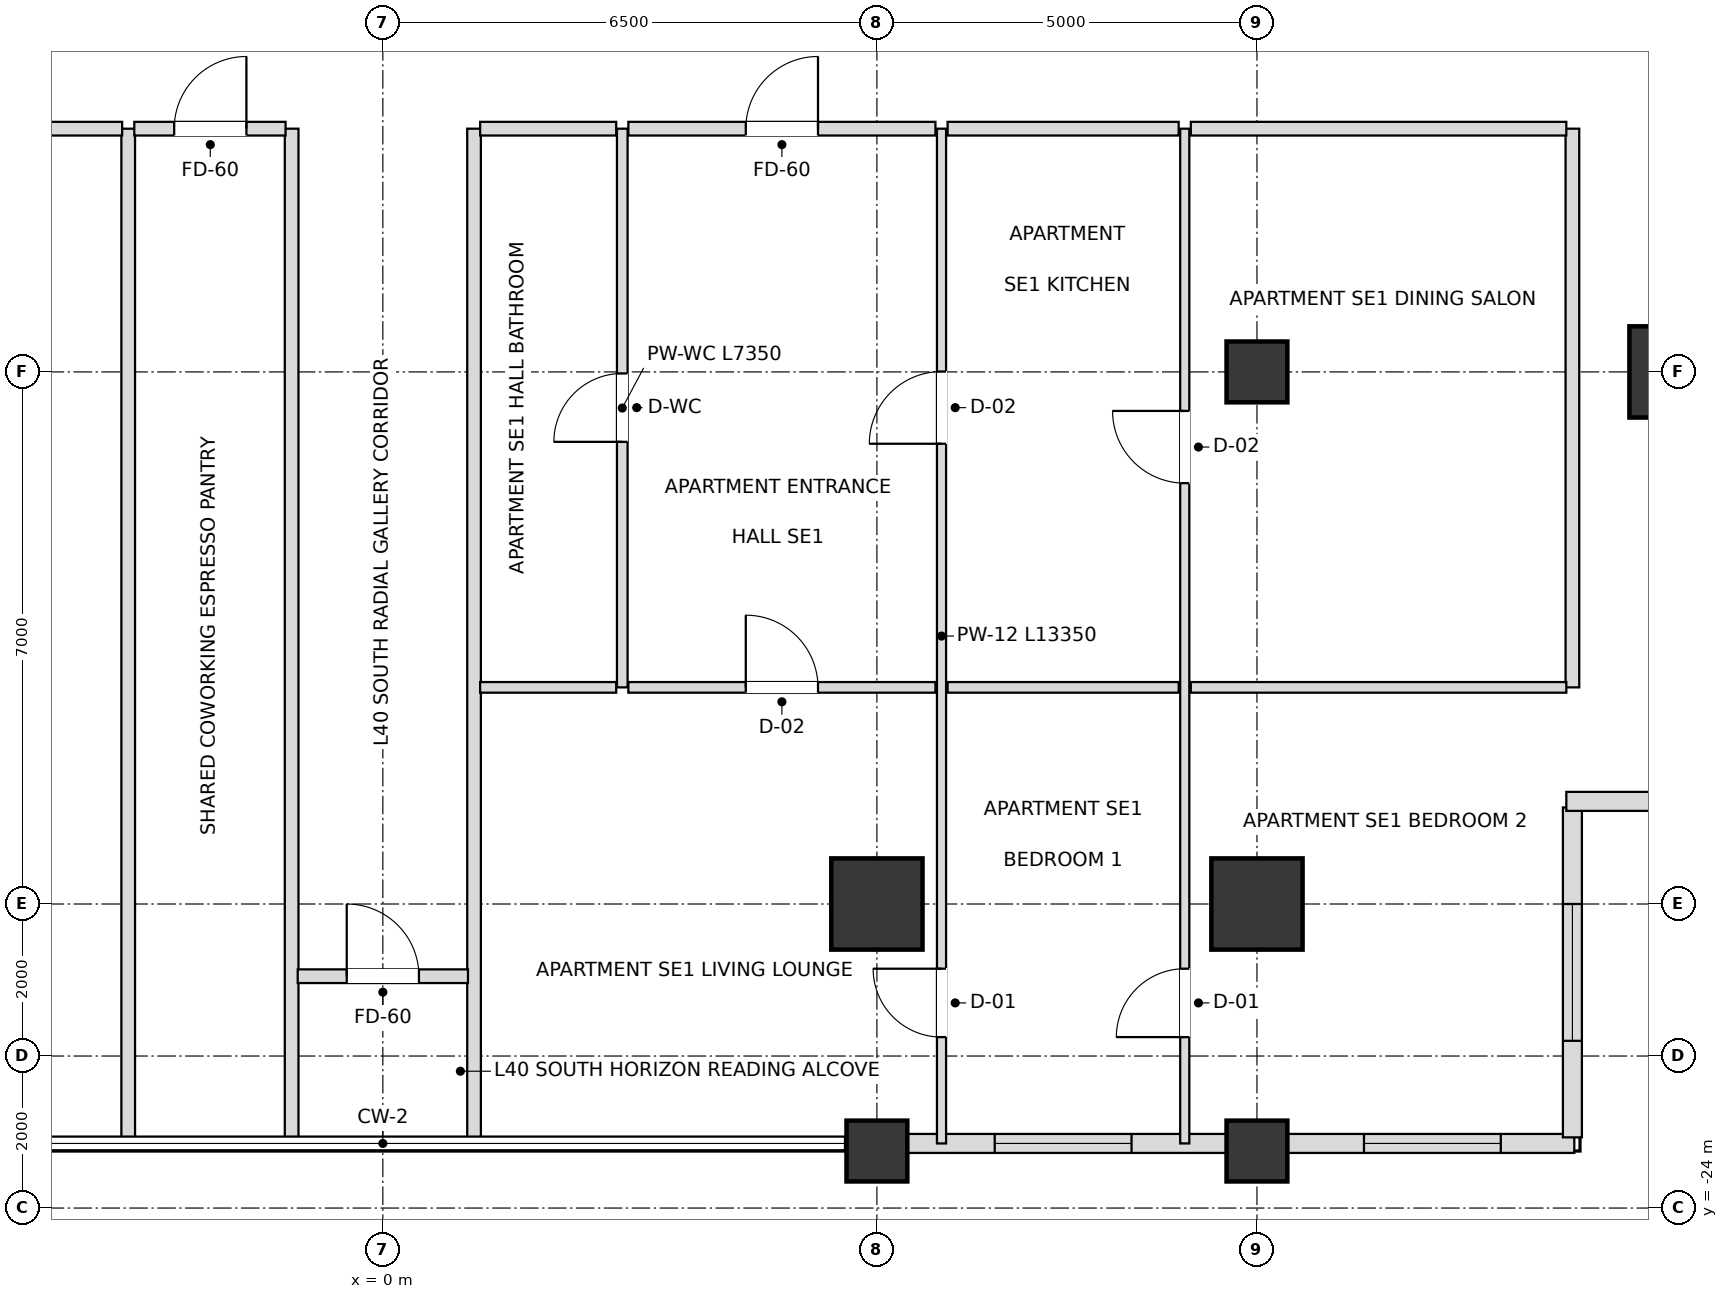
"""IFC4 building model, lengths in metres.
Left out: names, types, materials, properties, quantities, classifications, styles, units other than length and angle.
Written with IfcOpenShell. Run it as: python <this file> out.ifc"""

import sys

from ifc_helpers import new_model, si_unit, direction, frame, frame_2d, origin, origin_2d, place, context, subcontext, project, spatial, rectangle, extrude, element, fill, save


model = new_model("IFC4")
c1 = context("Model", 3, precision=1e-05, world=origin(), true_north=direction((0.0, 1.0)))
c2 = subcontext(c1, "Body", "Model", "MODEL_VIEW")
j1 = project(units=[si_unit("LENGTHUNIT", "METRE"), si_unit("PLANEANGLEUNIT", "RADIAN")], contexts=[c1])
p1 = place(None, origin())
s1 = spatial("IfcSite", under=j1, at=p1, CompositionType="ELEMENT")
p2 = place(p1, origin())
s2 = spatial("IfcBuilding", under=s1, at=p2, CompositionType="ELEMENT")
p3 = place(p2, frame((0.0, 0.0, 158.4)))
s3 = spatial("IfcBuildingStorey", under=s2, at=p3, CompositionType="ELEMENT", Elevation=158.4)
for number, where, z_axis, x_axis in (
    (1, (6.5, -20.0, 0.0), (0.0, 0.0, 1.0), (1.0, 0.0, 0.0)),
    (2, (11.5, -20.0, 0.0), (0.0, 0.0, 1.0), (1.0, 0.0, 0.0)),
    (3, (17.0, -13.0, 0.0), (0.0, 0.0, 1.0), (1.0, 0.0, 0.0)),
):
    element("IfcColumn", number, at=place(p3, frame(where, z_axis=z_axis, x_axis=x_axis)), inside=s3, PredefinedType="USERDEFINED", context=c2, shape_type="SweptSolid", body=[
        extrude(rectangle(XDim=1.2, YDim=1.2, at=origin_2d()), origin(), (0.0, 0.0, 1.0), 3.6),
    ])
for number, where, z_axis, x_axis in (
    (4, (11.5, -13.0, 0.0), (0.0, 0.0, 1.0), (1.0, 0.0, 0.0)),
    (5, (6.5, -23.25, 0.0), (0.0, 0.0, 1.0), (1.0, 0.0, 0.0)),
    (6, (11.5, -23.25, 0.0), (0.0, 0.0, 1.0), (1.0, 0.0, 0.0)),
):
    element("IfcColumn", number, at=place(p3, frame(where, z_axis=z_axis, x_axis=x_axis)), inside=s3, PredefinedType="COLUMN", context=c2, shape_type="SweptSolid", body=[
        extrude(rectangle(XDim=0.8, YDim=0.8, at=origin_2d()), origin(), (0.0, 0.0, 1.0), 3.6),
    ])
p4 = place(p3, frame((6.895, -23.15, 0.0), z_axis=(0.0, 0.0, 1.0), x_axis=(1.0, 0.0, 0.0)))
e7 = element("IfcWall", 7, at=p4, inside=s3, PredefinedType="SOLIDWALL", context=c2, shape_type="SweptSolid", body=[
    extrude(rectangle(XDim=4.21, YDim=0.25, at=frame_2d((2.105, 0.0))), origin(), (0.0, 0.0, 1.0), 2.736),
])
p5 = place(p4, frame((1.155, 0.0, 0.72)))
e8 = element("IfcOpeningElement", 8, at=p5, cuts=e7, PredefinedType="OPENING", context=c2, shape_type="SweptSolid", body=[
    extrude(rectangle(XDim=1.8, YDim=1.68, at=frame_2d((0.9, 0.84))), frame((0.0, 0.135, 0.0), z_axis=(0.0, -1.0, 0.0), x_axis=(1.0, 0.0, 0.0)), (0.0, 0.0, 1.0), 0.27),
])
p6 = place(p3, frame((11.895, -23.15, 0.0), z_axis=(0.0, 0.0, 1.0), x_axis=(1.0, 0.0, 0.0)))
e9 = element("IfcWall", 9, at=p6, inside=s3, PredefinedType="SOLIDWALL", context=c2, shape_type="SweptSolid", body=[
    extrude(rectangle(XDim=3.78, YDim=0.25, at=frame_2d((1.89, 0.0))), origin(), (0.0, 0.0, 1.0), 2.736),
])
p7 = place(p6, frame((1.013, 0.0, 0.72)))
e10 = element("IfcOpeningElement", 10, at=p7, cuts=e9, PredefinedType="OPENING", context=c2, shape_type="SweptSolid", body=[
    extrude(rectangle(XDim=1.8, YDim=1.68, at=frame_2d((0.9, 0.84))), frame((0.0, 0.135, 0.0), z_axis=(0.0, -1.0, 0.0), x_axis=(1.0, 0.0, 0.0)), (0.0, 0.0, 1.0), 0.27),
])
p8 = place(p3, frame((15.65, -23.07, 0.0), z_axis=(0.0, 0.0, 1.0), x_axis=(0.0, 1.0, 0.0)))
e11 = element("IfcWall", 11, at=p8, inside=s3, PredefinedType="SOLIDWALL", context=c2, shape_type="SweptSolid", body=[
    extrude(rectangle(XDim=4.34, YDim=0.25, at=frame_2d((2.17, 0.0))), origin(), (0.0, 0.0, 1.0), 2.736),
])
p9 = place(p8, frame((1.27, 0.0, 0.72)))
e12 = element("IfcOpeningElement", 12, at=p9, cuts=e11, PredefinedType="OPENING", context=c2, shape_type="SweptSolid", body=[
    extrude(rectangle(XDim=1.8, YDim=1.68, at=frame_2d((0.9, 0.84))), frame((0.0, 0.135, 0.0), z_axis=(0.0, -1.0, 0.0), x_axis=(1.0, 0.0, 0.0)), (0.0, 0.0, 1.0), 0.27),
])
p10 = place(p3, frame((15.57, -18.65, 0.0), z_axis=(0.0, 0.0, 1.0), x_axis=(1.0, 0.0, 0.0)))
e13 = element("IfcWall", 13, at=p10, inside=s3, PredefinedType="SOLIDWALL", context=c2, shape_type="SweptSolid", body=[
    extrude(rectangle(XDim=4.66, YDim=0.25, at=frame_2d((2.33, 0.0))), origin(), (0.0, 0.0, 1.0), 2.736),
])
p11 = place(p10, frame((1.43, 0.0, 0.72)))
e14 = element("IfcOpeningElement", 14, at=p11, cuts=e13, PredefinedType="OPENING", context=c2, shape_type="SweptSolid", body=[
    extrude(rectangle(XDim=1.8, YDim=1.68, at=frame_2d((0.9, 0.84))), frame((0.0, 0.135, 0.0), z_axis=(0.0, -1.0, 0.0), x_axis=(1.0, 0.0, 0.0)), (0.0, 0.0, 1.0), 0.27),
])
for number, where, z_axis, x_axis in (
    (15, (-3.35, -23.15, 0.0), (0.0, 0.0, 1.0), (0.0, 1.0, 0.0)),
    (16, (-1.2, -23.15, 0.0), (0.0, 0.0, 1.0), (0.0, 1.0, 0.0)),
    (17, (1.2, -23.15, 0.0), (0.0, 0.0, 1.0), (0.0, 1.0, 0.0)),
):
    element("IfcWall", number, at=place(p3, frame(where, z_axis=z_axis, x_axis=x_axis)), inside=s3, PredefinedType="PARTITIONING", context=c2, shape_type="SweptSolid", body=[
        extrude(rectangle(XDim=13.35, YDim=0.18, at=frame_2d((6.675, 0.0))), origin(), (0.0, 0.0, 1.0), 2.816),
    ])
p12 = place(p3, frame((3.15, -17.15, 0.0), z_axis=(0.0, 0.0, 1.0), x_axis=(0.0, 1.0, 0.0)))
e18 = element("IfcWall", 18, at=p12, inside=s3, PredefinedType="PARTITIONING", context=c2, shape_type="SweptSolid", body=[
    extrude(rectangle(XDim=7.35, YDim=0.14, at=frame_2d((3.675, 0.0))), origin(), (0.0, 0.0, 1.0), 3.38),
])
p13 = place(p12, frame((3.23, 0.0, 0.0)))
e19 = element("IfcOpeningElement", 19, at=p13, cuts=e18, PredefinedType="OPENING", context=c2, shape_type="SweptSolid", body=[
    extrude(rectangle(XDim=0.9, YDim=2.1, at=frame_2d((0.45, 1.05))), frame((0.0, 0.08, 0.0), z_axis=(0.0, -1.0, 0.0), x_axis=(1.0, 0.0, 0.0)), (0.0, 0.0, 1.0), 0.16),
])
p14 = place(p3, frame((7.35, -23.15, 0.0), z_axis=(0.0, 0.0, 1.0), x_axis=(0.0, 1.0, 0.0)))
e20 = element("IfcWall", 20, at=p14, inside=s3, PredefinedType="PARTITIONING", context=c2, shape_type="SweptSolid", body=[
    extrude(rectangle(XDim=13.35, YDim=0.12, at=frame_2d((6.675, 0.0))), origin(), (0.0, 0.0, 1.0), 2.816),
])
p15 = place(p14, frame((9.205, 0.0, 0.0)))
e21 = element("IfcOpeningElement", 21, at=p15, cuts=e20, PredefinedType="OPENING", context=c2, shape_type="SweptSolid", body=[
    extrude(rectangle(XDim=0.95, YDim=2.1, at=frame_2d((0.475, 1.05))), frame((0.0, 0.07, 0.0), z_axis=(0.0, -1.0, 0.0), x_axis=(1.0, 0.0, 0.0)), (0.0, 0.0, 1.0), 0.14),
])
p16 = place(p14, frame((1.399, 0.0, 0.0)))
e22 = element("IfcOpeningElement", 22, at=p16, cuts=e20, PredefinedType="OPENING", context=c2, shape_type="SweptSolid", body=[
    extrude(rectangle(XDim=0.9, YDim=2.1, at=frame_2d((0.45, 1.05))), frame((0.0, 0.07, 0.0), z_axis=(0.0, -1.0, 0.0), x_axis=(1.0, 0.0, 0.0)), (0.0, 0.0, 1.0), 0.14),
])
p17 = place(p3, frame((10.55, -23.15, 0.0), z_axis=(0.0, 0.0, 1.0), x_axis=(0.0, 1.0, 0.0)))
e23 = element("IfcWall", 23, at=p17, inside=s3, PredefinedType="PARTITIONING", context=c2, shape_type="SweptSolid", body=[
    extrude(rectangle(XDim=13.35, YDim=0.12, at=frame_2d((6.675, 0.0))), origin(), (0.0, 0.0, 1.0), 2.816),
])
p18 = place(p17, frame((8.687, 0.0, 0.0)))
e24 = element("IfcOpeningElement", 24, at=p18, cuts=e23, PredefinedType="OPENING", context=c2, shape_type="SweptSolid", body=[
    extrude(rectangle(XDim=0.95, YDim=2.1, at=frame_2d((0.475, 1.05))), frame((0.0, 0.07, 0.0), z_axis=(0.0, -1.0, 0.0), x_axis=(1.0, 0.0, 0.0)), (0.0, 0.0, 1.0), 0.14),
])
p19 = place(p17, frame((1.399, 0.0, 0.0)))
e25 = element("IfcOpeningElement", 25, at=p19, cuts=e23, PredefinedType="OPENING", context=c2, shape_type="SweptSolid", body=[
    extrude(rectangle(XDim=0.9, YDim=2.1, at=frame_2d((0.45, 1.05))), frame((0.0, 0.07, 0.0), z_axis=(0.0, -1.0, 0.0), x_axis=(1.0, 0.0, 0.0)), (0.0, 0.0, 1.0), 0.14),
])
p20 = place(p3, frame((15.65, -17.15, 0.0), z_axis=(0.0, 0.0, 1.0), x_axis=(0.0, 1.0, 0.0)))
e26 = element("IfcWall", 26, at=p20, inside=s3, PredefinedType="PARTITIONING", context=c2, shape_type="SweptSolid", body=[
    extrude(rectangle(XDim=7.35, YDim=0.18, at=frame_2d((3.675, 0.0))), origin(), (0.0, 0.0, 1.0), 2.736),
])
p21 = place(p3, frame((-1.12, -20.95, 0.0), z_axis=(0.0, 0.0, 1.0), x_axis=(1.0, 0.0, 0.0)))
e27 = element("IfcWall", 27, at=p21, inside=s3, PredefinedType="PARTITIONING", context=c2, shape_type="SweptSolid", body=[
    extrude(rectangle(XDim=2.24, YDim=0.18, at=frame_2d((1.12, 0.0))), origin(), (0.0, 0.0, 1.0), 3.38),
])
p22 = place(p21, frame((0.645, 0.0, 0.0)))
e28 = element("IfcOpeningElement", 28, at=p22, cuts=e27, PredefinedType="OPENING", context=c2, shape_type="SweptSolid", body=[
    extrude(rectangle(XDim=0.95, YDim=2.15, at=frame_2d((0.475, 1.075))), frame((0.0, 0.1, 0.0), z_axis=(0.0, -1.0, 0.0), x_axis=(1.0, 0.0, 0.0)), (0.0, 0.0, 1.0), 0.2),
])
p23 = place(p3, frame((1.28, -17.15, 0.0), z_axis=(0.0, 0.0, 1.0), x_axis=(1.0, 0.0, 0.0)))
e29 = element("IfcWall", 29, at=p23, inside=s3, PredefinedType="PARTITIONING", context=c2, shape_type="SweptSolid", body=[
    extrude(rectangle(XDim=1.79, YDim=0.14, at=frame_2d((0.895, 0.0))), origin(), (0.0, 0.0, 1.0), 3.38),
])
p24 = place(p3, frame((3.23, -17.15, 0.0), z_axis=(0.0, 0.0, 1.0), x_axis=(1.0, 0.0, 0.0)))
e30 = element("IfcWall", 30, at=p24, inside=s3, PredefinedType="PARTITIONING", context=c2, shape_type="SweptSolid", body=[
    extrude(rectangle(XDim=4.04, YDim=0.14, at=frame_2d((2.02, 0.0))), origin(), (0.0, 0.0, 1.0), 2.816),
])
p25 = place(p24, frame((1.545, 0.0, 0.0)))
e31 = element("IfcOpeningElement", 31, at=p25, cuts=e30, PredefinedType="OPENING", context=c2, shape_type="SweptSolid", body=[
    extrude(rectangle(XDim=0.95, YDim=2.1, at=frame_2d((0.475, 1.05))), frame((0.0, 0.08, 0.0), z_axis=(0.0, -1.0, 0.0), x_axis=(1.0, 0.0, 0.0)), (0.0, 0.0, 1.0), 0.16),
])
p26 = place(p3, frame((7.43, -17.15, 0.0), z_axis=(0.0, 0.0, 1.0), x_axis=(1.0, 0.0, 0.0)))
e32 = element("IfcWall", 32, at=p26, inside=s3, PredefinedType="PARTITIONING", context=c2, shape_type="SweptSolid", body=[
    extrude(rectangle(XDim=3.04, YDim=0.14, at=frame_2d((1.52, 0.0))), origin(), (0.0, 0.0, 1.0), 3.38),
])
p27 = place(p3, frame((10.63, -17.15, 0.0), z_axis=(0.0, 0.0, 1.0), x_axis=(1.0, 0.0, 0.0)))
e33 = element("IfcWall", 33, at=p27, inside=s3, PredefinedType="PARTITIONING", context=c2, shape_type="SweptSolid", body=[
    extrude(rectangle(XDim=4.94, YDim=0.14, at=frame_2d((2.47, 0.0))), origin(), (0.0, 0.0, 1.0), 2.736),
])
p28 = place(p3, frame((-10.67, -9.8, 0.0), z_axis=(0.0, 0.0, 1.0), x_axis=(1.0, 0.0, 0.0)))
e34 = element("IfcWall", 34, at=p28, inside=s3, PredefinedType="PARTITIONING", context=c2, shape_type="SweptSolid", body=[
    extrude(rectangle(XDim=7.24, YDim=0.18, at=frame_2d((3.62, 0.0))), origin(), (0.0, 0.0, 1.0), 2.816),
])
p29 = place(p28, frame((3.155, 0.0, 0.0)))
e35 = element("IfcOpeningElement", 35, at=p29, cuts=e34, PredefinedType="OPENING", context=c2, shape_type="SweptSolid", body=[
    extrude(rectangle(XDim=0.95, YDim=2.15, at=frame_2d((0.475, 1.075))), frame((0.0, 0.1, 0.0), z_axis=(0.0, -1.0, 0.0), x_axis=(1.0, 0.0, 0.0)), (0.0, 0.0, 1.0), 0.2),
])
p30 = place(p3, frame((-3.27, -9.8, 0.0), z_axis=(0.0, 0.0, 1.0), x_axis=(1.0, 0.0, 0.0)))
e36 = element("IfcWall", 36, at=p30, inside=s3, PredefinedType="PARTITIONING", context=c2, shape_type="SweptSolid", body=[
    extrude(rectangle(XDim=1.99, YDim=0.18, at=frame_2d((0.995, 0.0))), origin(), (0.0, 0.0, 1.0), 3.38),
])
p31 = place(p30, frame((0.525, 0.0, 0.0)))
e37 = element("IfcOpeningElement", 37, at=p31, cuts=e36, PredefinedType="OPENING", context=c2, shape_type="SweptSolid", body=[
    extrude(rectangle(XDim=0.95, YDim=2.15, at=frame_2d((0.475, 1.075))), frame((0.0, 0.1, 0.0), z_axis=(0.0, -1.0, 0.0), x_axis=(1.0, 0.0, 0.0)), (0.0, 0.0, 1.0), 0.2),
])
p32 = place(p3, frame((1.28, -9.8, 0.0), z_axis=(0.0, 0.0, 1.0), x_axis=(1.0, 0.0, 0.0)))
e38 = element("IfcWall", 38, at=p32, inside=s3, PredefinedType="PARTITIONING", context=c2, shape_type="SweptSolid", body=[
    extrude(rectangle(XDim=1.79, YDim=0.18, at=frame_2d((0.895, 0.0))), origin(), (0.0, 0.0, 1.0), 3.38),
])
p33 = place(p3, frame((3.23, -9.8, 0.0), z_axis=(0.0, 0.0, 1.0), x_axis=(1.0, 0.0, 0.0)))
e39 = element("IfcWall", 39, at=p33, inside=s3, PredefinedType="PARTITIONING", context=c2, shape_type="SweptSolid", body=[
    extrude(rectangle(XDim=4.04, YDim=0.18, at=frame_2d((2.02, 0.0))), origin(), (0.0, 0.0, 1.0), 2.816),
])
p34 = place(p33, frame((1.545, 0.0, 0.0)))
e40 = element("IfcOpeningElement", 40, at=p34, cuts=e39, PredefinedType="OPENING", context=c2, shape_type="SweptSolid", body=[
    extrude(rectangle(XDim=0.95, YDim=2.15, at=frame_2d((0.475, 1.075))), frame((0.0, 0.1, 0.0), z_axis=(0.0, -1.0, 0.0), x_axis=(1.0, 0.0, 0.0)), (0.0, 0.0, 1.0), 0.2),
])
p35 = place(p3, frame((7.43, -9.8, 0.0), z_axis=(0.0, 0.0, 1.0), x_axis=(1.0, 0.0, 0.0)))
e41 = element("IfcWall", 41, at=p35, inside=s3, PredefinedType="PARTITIONING", context=c2, shape_type="SweptSolid", body=[
    extrude(rectangle(XDim=3.04, YDim=0.18, at=frame_2d((1.52, 0.0))), origin(), (0.0, 0.0, 1.0), 3.38),
])
p36 = place(p3, frame((10.63, -9.8, 0.0), z_axis=(0.0, 0.0, 1.0), x_axis=(1.0, 0.0, 0.0)))
e42 = element("IfcWall", 42, at=p36, inside=s3, PredefinedType="PARTITIONING", context=c2, shape_type="SweptSolid", body=[
    extrude(rectangle(XDim=4.94, YDim=0.18, at=frame_2d((2.47, 0.0))), origin(), (0.0, 0.0, 1.0), 3.38),
])
p37 = place(p5, origin())
e43 = element("IfcWindow", 43, at=p37, inside=s3, PartitioningType="SINGLE_PANEL", PredefinedType="WINDOW", context=c2, shape_type="SweptSolid", body=[
    extrude(rectangle(XDim=1.8, YDim=1.68, at=frame_2d((0.9, 0.84))), frame((0.0, 0.03, 0.0), z_axis=(0.0, -1.0, 0.0), x_axis=(1.0, 0.0, 0.0)), (0.0, 0.0, 1.0), 0.06),
])
fill(e8, e43)
p38 = place(p7, origin())
e44 = element("IfcWindow", 44, at=p38, inside=s3, PartitioningType="SINGLE_PANEL", PredefinedType="WINDOW", context=c2, shape_type="SweptSolid", body=[
    extrude(rectangle(XDim=1.8, YDim=1.68, at=frame_2d((0.9, 0.84))), frame((0.0, 0.03, 0.0), z_axis=(0.0, -1.0, 0.0), x_axis=(1.0, 0.0, 0.0)), (0.0, 0.0, 1.0), 0.06),
])
fill(e10, e44)
p39 = place(p9, origin())
e45 = element("IfcWindow", 45, at=p39, inside=s3, PartitioningType="SINGLE_PANEL", PredefinedType="WINDOW", context=c2, shape_type="SweptSolid", body=[
    extrude(rectangle(XDim=1.8, YDim=1.68, at=frame_2d((0.9, 0.84))), frame((0.0, 0.03, 0.0), z_axis=(0.0, -1.0, 0.0), x_axis=(1.0, 0.0, 0.0)), (0.0, 0.0, 1.0), 0.06),
])
fill(e12, e45)
p40 = place(p22, origin())
e46 = element("IfcDoor", 46, at=p40, inside=s3, OperationType="SINGLE_SWING_LEFT", PredefinedType="DOOR", context=c2, shape_type="SweptSolid", body=[
    extrude(rectangle(XDim=0.95, YDim=2.15, at=frame_2d((0.475, 1.075))), frame((0.0, 0.025, 0.0), z_axis=(0.0, -1.0, 0.0), x_axis=(1.0, 0.0, 0.0)), (0.0, 0.0, 1.0), 0.05),
])
fill(e28, e46)
p41 = place(p31, origin())
e47 = element("IfcDoor", 47, at=p41, inside=s3, OperationType="SINGLE_SWING_RIGHT", PredefinedType="DOOR", context=c2, shape_type="SweptSolid", body=[
    extrude(rectangle(XDim=0.95, YDim=2.15, at=frame_2d((0.475, 1.075))), frame((0.0, 0.025, 0.0), z_axis=(0.0, -1.0, 0.0), x_axis=(1.0, 0.0, 0.0)), (0.0, 0.0, 1.0), 0.05),
])
fill(e37, e47)
p42 = place(p13, origin())
e48 = element("IfcDoor", 48, at=p42, inside=s3, OperationType="SINGLE_SWING_LEFT", PredefinedType="DOOR", context=c2, shape_type="SweptSolid", body=[
    extrude(rectangle(XDim=0.9, YDim=2.1, at=frame_2d((0.45, 1.05))), frame((0.0, 0.025, 0.0), z_axis=(0.0, -1.0, 0.0), x_axis=(1.0, 0.0, 0.0)), (0.0, 0.0, 1.0), 0.05),
])
fill(e19, e48)
p43 = place(p34, origin())
e49 = element("IfcDoor", 49, at=p43, inside=s3, OperationType="SINGLE_SWING_RIGHT", PredefinedType="DOOR", context=c2, shape_type="SweptSolid", body=[
    extrude(rectangle(XDim=0.95, YDim=2.15, at=frame_2d((0.475, 1.075))), frame((0.0, 0.025, 0.0), z_axis=(0.0, -1.0, 0.0), x_axis=(1.0, 0.0, 0.0)), (0.0, 0.0, 1.0), 0.05),
])
fill(e40, e49)
p44 = place(p15, origin())
e50 = element("IfcDoor", 50, at=p44, inside=s3, OperationType="SINGLE_SWING_LEFT", PredefinedType="DOOR", context=c2, shape_type="SweptSolid", body=[
    extrude(rectangle(XDim=0.95, YDim=2.1, at=frame_2d((0.475, 1.05))), frame((0.0, 0.025, 0.0), z_axis=(0.0, -1.0, 0.0), x_axis=(1.0, 0.0, 0.0)), (0.0, 0.0, 1.0), 0.05),
])
fill(e21, e50)
p45 = place(p18, origin())
e51 = element("IfcDoor", 51, at=p45, inside=s3, OperationType="SINGLE_SWING_RIGHT", PredefinedType="DOOR", context=c2, shape_type="SweptSolid", body=[
    extrude(rectangle(XDim=0.95, YDim=2.1, at=frame_2d((0.475, 1.05))), frame((0.0, 0.025, 0.0), z_axis=(0.0, -1.0, 0.0), x_axis=(1.0, 0.0, 0.0)), (0.0, 0.0, 1.0), 0.05),
])
fill(e24, e51)
p46 = place(p25, origin())
e52 = element("IfcDoor", 52, at=p46, inside=s3, OperationType="SINGLE_SWING_LEFT", PredefinedType="DOOR", context=c2, shape_type="SweptSolid", body=[
    extrude(rectangle(XDim=0.95, YDim=2.1, at=frame_2d((0.475, 1.05))), frame((0.0, 0.025, 0.0), z_axis=(0.0, -1.0, 0.0), x_axis=(1.0, 0.0, 0.0)), (0.0, 0.0, 1.0), 0.05),
])
fill(e31, e52)
p47 = place(p16, origin())
e53 = element("IfcDoor", 53, at=p47, inside=s3, OperationType="SINGLE_SWING_RIGHT", PredefinedType="DOOR", context=c2, shape_type="SweptSolid", body=[
    extrude(rectangle(XDim=0.9, YDim=2.1, at=frame_2d((0.45, 1.05))), frame((0.0, 0.025, 0.0), z_axis=(0.0, -1.0, 0.0), x_axis=(1.0, 0.0, 0.0)), (0.0, 0.0, 1.0), 0.05),
])
fill(e22, e53)
p48 = place(p19, origin())
e54 = element("IfcDoor", 54, at=p48, inside=s3, OperationType="SINGLE_SWING_LEFT", PredefinedType="DOOR", context=c2, shape_type="SweptSolid", body=[
    extrude(rectangle(XDim=0.9, YDim=2.1, at=frame_2d((0.45, 1.05))), frame((0.0, 0.025, 0.0), z_axis=(0.0, -1.0, 0.0), x_axis=(1.0, 0.0, 0.0)), (0.0, 0.0, 1.0), 0.05),
])
fill(e25, e54)
save(model, sys.argv[1])
